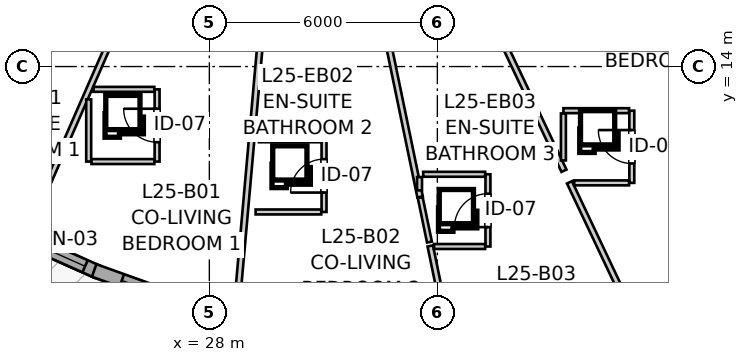
"""IFC4 building model, lengths in metres.
Left out: names, types, materials, properties, quantities, classifications, styles, units other than length and angle.
Written with IfcOpenShell. Run it as: python <this file> out.ifc"""

import sys

from ifc_helpers import new_model, si_unit, direction, frame, frame_2d, origin, place, context, subcontext, project, spatial, rectangle, extrude, source, transform, mapped, element, fill, save


model = new_model("IFC4")
c1 = context("Model", 3, precision=1e-05, world=origin(), true_north=direction((0.0, 1.0)))
c2 = subcontext(c1, "Body", "Model", "MODEL_VIEW")
j1 = project(units=[si_unit("LENGTHUNIT", "METRE"), si_unit("PLANEANGLEUNIT", "RADIAN")], contexts=[c1])
p1 = place(None, origin())
s1 = spatial("IfcSite", under=j1, at=p1, CompositionType="ELEMENT")
p2 = place(p1, origin())
s2 = spatial("IfcBuilding", under=s1, at=p2, CompositionType="ELEMENT")
p3 = place(p2, frame((0.0, 0.0, 86.4)))
s3 = spatial("IfcBuildingStorey", under=s2, at=p3, CompositionType="ELEMENT", Elevation=86.4)
p4 = place(p3, frame((22.503, 9.737, 0.0), z_axis=(0.0, 0.0, 1.0), x_axis=(0.913443049169, -0.406966578388, 0.0)))
e1 = element("IfcWall", 1, at=p4, inside=s3, PredefinedType="SOLIDWALL", context=c2, shape_type="SweptSolid", body=[
    extrude(rectangle(XDim=2.79, YDim=0.35, at=frame_2d((1.395, 0.0))), origin(), (0.0, 0.0, 1.0), 2.48),
])
p5 = place(p4, frame((0.938, 0.0, 0.82)))
e2 = element("IfcOpeningElement", 2, at=p5, cuts=e1, PredefinedType="OPENING", context=c2, shape_type="SweptSolid", body=[
    extrude(rectangle(XDim=1.5, YDim=1.45, at=frame_2d((0.75, 0.725))), frame((0.0, 0.185, 0.0), z_axis=(0.0, -1.0, 0.0), x_axis=(1.0, 0.0, 0.0)), (0.0, 0.0, 1.0), 0.37),
])
p6 = place(p3, frame((24.969, 8.635, 0.0), z_axis=(0.0, 0.0, 1.0), x_axis=(0.941099972293, -0.338128440315, 0.0)))
e3 = element("IfcWall", 3, at=p6, inside=s3, PredefinedType="SOLIDWALL", context=c2, shape_type="SweptSolid", body=[
    extrude(rectangle(XDim=3.028, YDim=0.35, at=frame_2d((1.514, 0.0))), origin(), (0.0, 0.0, 1.0), 2.48),
])
p7 = place(p6, frame((0.774, 0.0, 0.82)))
e4 = element("IfcOpeningElement", 4, at=p7, cuts=e3, PredefinedType="OPENING", context=c2, shape_type="SweptSolid", body=[
    extrude(rectangle(XDim=1.5, YDim=1.45, at=frame_2d((0.75, 0.725))), frame((0.0, 0.185, 0.0), z_axis=(0.0, -1.0, 0.0), x_axis=(1.0, 0.0, 0.0)), (0.0, 0.0, 1.0), 0.37),
])
p8 = place(p3, frame((26.625, 11.5, 0.0), z_axis=(0.0, 0.0, 1.0), x_axis=(0.0, 1.0, 0.0)))
e5 = element("IfcWall", 5, at=p8, inside=s3, PredefinedType="PARTITIONING", context=c2, shape_type="SweptSolid", body=[
    extrude(rectangle(XDim=1.9, YDim=0.13, at=frame_2d((0.95, 0.0))), origin(), (0.0, 0.0, 1.0), 2.95),
])
p9 = place(p8, frame((0.51, 0.0, 0.0)))
e6 = element("IfcOpeningElement", 6, at=p9, cuts=e5, PredefinedType="OPENING", context=c2, shape_type="SweptSolid", body=[
    extrude(rectangle(XDim=0.88, YDim=2.05, at=frame_2d((0.44, 1.025))), frame((0.0, 0.075, 0.0), z_axis=(0.0, -1.0, 0.0), x_axis=(1.0, 0.0, 0.0)), (0.0, 0.0, 1.0), 0.15),
])
p10 = place(p3, frame((31.018, 10.174, 0.0), z_axis=(0.0, 0.0, 1.0), x_axis=(0.0, 1.0, 0.0)))
e7 = element("IfcWall", 7, at=p10, inside=s3, PredefinedType="PARTITIONING", context=c2, shape_type="SweptSolid", body=[
    extrude(rectangle(XDim=1.9, YDim=0.13, at=frame_2d((0.95, 0.0))), origin(), (0.0, 0.0, 1.0), 2.95),
])
p11 = place(p10, frame((0.51, 0.0, 0.0)))
e8 = element("IfcOpeningElement", 8, at=p11, cuts=e7, PredefinedType="OPENING", context=c2, shape_type="SweptSolid", body=[
    extrude(rectangle(XDim=0.88, YDim=2.05, at=frame_2d((0.44, 1.025))), frame((0.0, 0.075, 0.0), z_axis=(0.0, -1.0, 0.0), x_axis=(1.0, 0.0, 0.0)), (0.0, 0.0, 1.0), 0.15),
])
p12 = place(p3, frame((39.117, 10.939, 0.0), z_axis=(0.0, 0.0, 1.0), x_axis=(0.0, 1.0, 0.0)))
e9 = element("IfcWall", 9, at=p12, inside=s3, PredefinedType="PARTITIONING", context=c2, shape_type="SweptSolid", body=[
    extrude(rectangle(XDim=1.9, YDim=0.13, at=frame_2d((0.95, 0.0))), origin(), (0.0, 0.0, 1.0), 2.95),
])
p13 = place(p12, frame((0.51, 0.0, 0.0)))
e10 = element("IfcOpeningElement", 10, at=p13, cuts=e9, PredefinedType="OPENING", context=c2, shape_type="SweptSolid", body=[
    extrude(rectangle(XDim=0.88, YDim=2.05, at=frame_2d((0.44, 1.025))), frame((0.0, 0.075, 0.0), z_axis=(0.0, -1.0, 0.0), x_axis=(1.0, 0.0, 0.0)), (0.0, 0.0, 1.0), 0.15),
])
p14 = place(p3, frame((35.331, 9.265, 0.0), z_axis=(0.0, 0.0, 1.0), x_axis=(0.0, 1.0, 0.0)))
e11 = element("IfcWall", 11, at=p14, inside=s3, PredefinedType="PARTITIONING", context=c2, shape_type="SweptSolid", body=[
    extrude(rectangle(XDim=1.9, YDim=0.13, at=frame_2d((0.95, 0.0))), origin(), (0.0, 0.0, 1.0), 2.95),
])
p15 = place(p14, frame((0.51, 0.0, 0.0)))
e12 = element("IfcOpeningElement", 12, at=p15, cuts=e11, PredefinedType="OPENING", context=c2, shape_type="SweptSolid", body=[
    extrude(rectangle(XDim=0.88, YDim=2.05, at=frame_2d((0.44, 1.025))), frame((0.0, 0.075, 0.0), z_axis=(0.0, -1.0, 0.0), x_axis=(1.0, 0.0, 0.0)), (0.0, 0.0, 1.0), 0.15),
])
p16 = place(p3, frame((28.711, 7.564, 0.0), z_axis=(0.0, 0.0, 1.0), x_axis=(0.088615013812, 0.996065951294, 0.0)))
e13 = element("IfcWall", 13, at=p16, inside=s3, PredefinedType="PARTITIONING", context=c2, shape_type="SweptSolid", body=[
    extrude(rectangle(XDim=7.943, YDim=0.145, at=frame_2d((3.971, 0.0))), origin(), (0.0, 0.0, 1.0), 2.95),
])
p17 = place(p3, frame((23.186, 9.634, 0.0), z_axis=(0.0, 0.0, 1.0), x_axis=(0.400994208685, 0.916080588486, 0.0)))
e14 = element("IfcWall", 14, at=p17, inside=s3, PredefinedType="PARTITIONING", context=c2, shape_type="SweptSolid", body=[
    extrude(rectangle(XDim=6.353, YDim=0.145, at=frame_2d((3.177, 0.0))), origin(), (0.0, 0.0, 1.0), 2.95),
])
p18 = place(p3, frame((38.667, 17.429, 0.0), z_axis=(0.0, 0.0, 1.0), x_axis=(0.696417222112, -0.717637131666, 0.0)))
e15 = element("IfcWall", 15, at=p18, inside=s3, PredefinedType="PARTITIONING", context=c2, shape_type="SweptSolid", body=[
    extrude(rectangle(XDim=6.04, YDim=0.145, at=frame_2d((3.02, 0.0))), origin(), (0.0, 0.0, 1.0), 2.95),
])
p19 = place(p3, frame((32.531, 15.468, 0.0), z_axis=(0.0, 0.0, 1.0), x_axis=(0.202792769077, -0.979221677053, 0.0)))
e16 = element("IfcWall", 16, at=p19, inside=s3, PredefinedType="PARTITIONING", context=c2, shape_type="SweptSolid", body=[
    extrude(rectangle(XDim=5.003, YDim=0.145, at=frame_2d((2.502, 0.0))), origin(), (0.0, 0.0, 1.0), 2.95),
])
p20 = place(p3, frame((37.476, 10.954, 0.0), z_axis=(0.0, 0.0, 1.0), x_axis=(0.428094746621, -0.903733859007, 0.0)))
e17 = element("IfcWall", 17, at=p20, inside=s3, PredefinedType="PARTITIONING", context=c2, shape_type="SweptSolid", body=[
    extrude(rectangle(XDim=4.996, YDim=0.145, at=frame_2d((2.498, 0.0))), origin(), (0.0, 0.0, 1.0), 2.95),
])
p21 = place(p3, frame((35.346, 15.452, 0.0), z_axis=(0.0, 0.0, 1.0), x_axis=(0.428023015228, -0.903767834366, 0.0)))
e18 = element("IfcWall", 18, at=p21, inside=s3, PredefinedType="PARTITIONING", context=c2, shape_type="SweptSolid", body=[
    extrude(rectangle(XDim=4.64, YDim=0.145, at=frame_2d((2.32, 0.0))), origin(), (0.0, 0.0, 1.0), 2.95),
])
p22 = place(p3, frame((33.813, 9.28, 0.0), z_axis=(0.0, 0.0, 1.0), x_axis=(0.202648062782, -0.979251633979, 0.0)))
e19 = element("IfcWall", 19, at=p22, inside=s3, PredefinedType="PARTITIONING", context=c2, shape_type="SweptSolid", body=[
    extrude(rectangle(XDim=3.232, YDim=0.145, at=frame_2d((1.616, 0.0))), origin(), (0.0, 0.0, 1.0), 2.95),
])
p23 = place(p3, frame((24.825, 11.5, 0.0), z_axis=(0.0, 0.0, 1.0), x_axis=(0.0, 1.0, 0.0)))
e20 = element("IfcWall", 20, at=p23, inside=s3, PredefinedType="PARTITIONING", context=c2, shape_type="SweptSolid", body=[
    extrude(rectangle(XDim=1.637, YDim=0.13, at=frame_2d((0.818, 0.0))), origin(), (0.0, 0.0, 1.0), 2.95),
])
p24 = place(p3, frame((33.626, 11.165, 0.0), z_axis=(0.0, 0.0, 1.0), x_axis=(1.0, 0.0, 0.0)))
e21 = element("IfcWall", 21, at=p24, inside=s3, PredefinedType="PARTITIONING", context=c2, shape_type="SweptSolid", body=[
    extrude(rectangle(XDim=1.632, YDim=0.13, at=frame_2d((0.816, 0.0))), origin(), (0.0, 0.0, 1.0), 2.95),
])
p25 = place(p3, frame((24.898, 11.5, 0.0), z_axis=(0.0, 0.0, 1.0), x_axis=(1.0, 0.0, 0.0)))
e22 = element("IfcWall", 22, at=p25, inside=s3, PredefinedType="PARTITIONING", context=c2, shape_type="SweptSolid", body=[
    extrude(rectangle(XDim=1.654, YDim=0.13, at=frame_2d((0.827, 0.0))), origin(), (0.0, 0.0, 1.0), 2.558),
])
p26 = place(p3, frame((29.305, 12.074, 0.0), z_axis=(0.0, 0.0, 1.0), x_axis=(1.0, 0.0, 0.0)))
e23 = element("IfcWall", 23, at=p26, inside=s3, PredefinedType="PARTITIONING", context=c2, shape_type="SweptSolid", body=[
    extrude(rectangle(XDim=1.64, YDim=0.13, at=frame_2d((0.82, 0.0))), origin(), (0.0, 0.0, 1.0), 2.95),
])
p27 = place(p3, frame((29.218, 10.174, 0.0), z_axis=(0.0, 0.0, 1.0), x_axis=(1.0, 0.0, 0.0)))
e24 = element("IfcWall", 24, at=p27, inside=s3, PredefinedType="PARTITIONING", context=c2, shape_type="SweptSolid", body=[
    extrude(rectangle(XDim=1.727, YDim=0.13, at=frame_2d((0.864, 0.0))), origin(), (0.0, 0.0, 1.0), 2.558),
])
p28 = place(p3, frame((37.317, 12.839, 0.0), z_axis=(0.0, 0.0, 1.0), x_axis=(1.0, 0.0, 0.0)))
e25 = element("IfcWall", 25, at=p28, inside=s3, PredefinedType="PARTITIONING", context=c2, shape_type="SweptSolid", body=[
    extrude(rectangle(XDim=1.727, YDim=0.13, at=frame_2d((0.864, 0.0))), origin(), (0.0, 0.0, 1.0), 2.95),
])
p29 = place(p3, frame((24.951, 13.4, 0.0), z_axis=(0.0, 0.0, 1.0), x_axis=(1.0, 0.0, 0.0)))
e26 = element("IfcWall", 26, at=p29, inside=s3, PredefinedType="PARTITIONING", context=c2, shape_type="SweptSolid", body=[
    extrude(rectangle(XDim=1.601, YDim=0.13, at=frame_2d((0.801, 0.0))), origin(), (0.0, 0.0, 1.0), 2.95),
])
p30 = place(p3, frame((37.602, 10.939, 0.0), z_axis=(0.0, 0.0, 1.0), x_axis=(1.0, 0.0, 0.0)))
e27 = element("IfcWall", 27, at=p30, inside=s3, PredefinedType="PARTITIONING", context=c2, shape_type="SweptSolid", body=[
    extrude(rectangle(XDim=1.442, YDim=0.13, at=frame_2d((0.721, 0.0))), origin(), (0.0, 0.0, 1.0), 2.95),
])
p31 = place(p3, frame((37.317, 11.53, 0.0), z_axis=(0.0, 0.0, 1.0), x_axis=(0.0, 1.0, 0.0)))
e28 = element("IfcWall", 28, at=p31, inside=s3, PredefinedType="PARTITIONING", context=c2, shape_type="SweptSolid", body=[
    extrude(rectangle(XDim=1.236, YDim=0.13, at=frame_2d((0.618, 0.0))), origin(), (0.0, 0.0, 1.0), 2.95),
])
p32 = place(p3, frame((33.912, 9.265, 0.0), z_axis=(0.0, 0.0, 1.0), x_axis=(1.0, 0.0, 0.0)))
e29 = element("IfcWall", 29, at=p32, inside=s3, PredefinedType="PARTITIONING", context=c2, shape_type="SweptSolid", body=[
    extrude(rectangle(XDim=1.346, YDim=0.13, at=frame_2d((0.673, 0.0))), origin(), (0.0, 0.0, 1.0), 2.95),
])
p33 = place(p3, frame((33.549, 10.553, 0.0), z_axis=(0.0, 0.0, 1.0), x_axis=(0.202855035592, -0.97920877985, 0.0)))
e30 = element("IfcWall", 30, at=p33, inside=s3, PredefinedType="PARTITIONING", context=c2, shape_type="SweptSolid", body=[
    extrude(rectangle(XDim=1.198, YDim=0.13, at=frame_2d((0.599, 0.0))), origin(), (0.0, 0.0, 1.0), 2.95),
])
p34 = place(p3, frame((33.531, 10.742, 0.0), z_axis=(0.0, 0.0, 1.0), x_axis=(0.0, 1.0, 0.0)))
e31 = element("IfcWall", 31, at=p34, inside=s3, PredefinedType="PARTITIONING", context=c2, shape_type="SweptSolid", body=[
    extrude(rectangle(XDim=0.35, YDim=0.13, at=frame_2d((0.175, 0.0))), origin(), (0.0, 0.0, 1.0), 2.95),
])
m1 = source(origin(), c2, "Body", "SweptSolid", [
    extrude(rectangle(XDim=1.5, YDim=1.45, at=frame_2d((0.75, 0.725))), frame((0.0, 0.03, 0.0), z_axis=(0.0, -1.0, 0.0), x_axis=(1.0, 0.0, 0.0)), (0.0, 0.0, 1.0), 0.06),
])
p35 = place(p5, origin())
e32 = element("IfcWindow", 32, at=p35, inside=s3, PartitioningType="SINGLE_PANEL", PredefinedType="WINDOW", context=c2, shape_type="MappedRepresentation", body=[
    mapped(m1, transform((0.0, 0.0, 0.0), x_axis=(1.0, 0.0, 0.0), y_axis=(0.0, 1.0, 0.0), z_axis=(0.0, 0.0, 1.0), scale=1.0)),
])
fill(e2, e32)
p36 = place(p7, origin())
e33 = element("IfcWindow", 33, at=p36, inside=s3, PartitioningType="SINGLE_PANEL", PredefinedType="WINDOW", context=c2, shape_type="MappedRepresentation", body=[
    mapped(m1, transform((0.0, 0.0, 0.0), x_axis=(1.0, 0.0, 0.0), y_axis=(0.0, 1.0, 0.0), z_axis=(0.0, 0.0, 1.0), scale=1.0)),
])
fill(e4, e33)
m2 = source(origin(), c2, "Body", "SweptSolid", [
    extrude(rectangle(XDim=0.88, YDim=2.05, at=frame_2d((0.44, 1.025))), frame((0.0, 0.025, 0.0), z_axis=(0.0, -1.0, 0.0), x_axis=(1.0, 0.0, 0.0)), (0.0, 0.0, 1.0), 0.05),
])
p37 = place(p9, origin())
e34 = element("IfcDoor", 34, at=p37, inside=s3, OperationType="SINGLE_SWING_RIGHT", PredefinedType="DOOR", context=c2, shape_type="MappedRepresentation", body=[
    mapped(m2, transform((0.0, 0.0, 0.0), x_axis=(1.0, 0.0, 0.0), y_axis=(0.0, 1.0, 0.0), z_axis=(0.0, 0.0, 1.0), scale=1.0)),
])
fill(e6, e34)
p38 = place(p11, origin())
e35 = element("IfcDoor", 35, at=p38, inside=s3, OperationType="SINGLE_SWING_LEFT", PredefinedType="DOOR", context=c2, shape_type="MappedRepresentation", body=[
    mapped(m2, transform((0.0, 0.0, 0.0), x_axis=(1.0, 0.0, 0.0), y_axis=(0.0, 1.0, 0.0), z_axis=(0.0, 0.0, 1.0), scale=1.0)),
])
fill(e8, e35)
p39 = place(p13, origin())
e36 = element("IfcDoor", 36, at=p39, inside=s3, OperationType="SINGLE_SWING_RIGHT", PredefinedType="DOOR", context=c2, shape_type="MappedRepresentation", body=[
    mapped(m2, transform((0.0, 0.0, 0.0), x_axis=(1.0, 0.0, 0.0), y_axis=(0.0, 1.0, 0.0), z_axis=(0.0, 0.0, 1.0), scale=1.0)),
])
fill(e10, e36)
p40 = place(p15, origin())
e37 = element("IfcDoor", 37, at=p40, inside=s3, OperationType="SINGLE_SWING_LEFT", PredefinedType="DOOR", context=c2, shape_type="MappedRepresentation", body=[
    mapped(m2, transform((0.0, 0.0, 0.0), x_axis=(1.0, 0.0, 0.0), y_axis=(0.0, 1.0, 0.0), z_axis=(0.0, 0.0, 1.0), scale=1.0)),
])
fill(e12, e37)
save(model, sys.argv[1])
